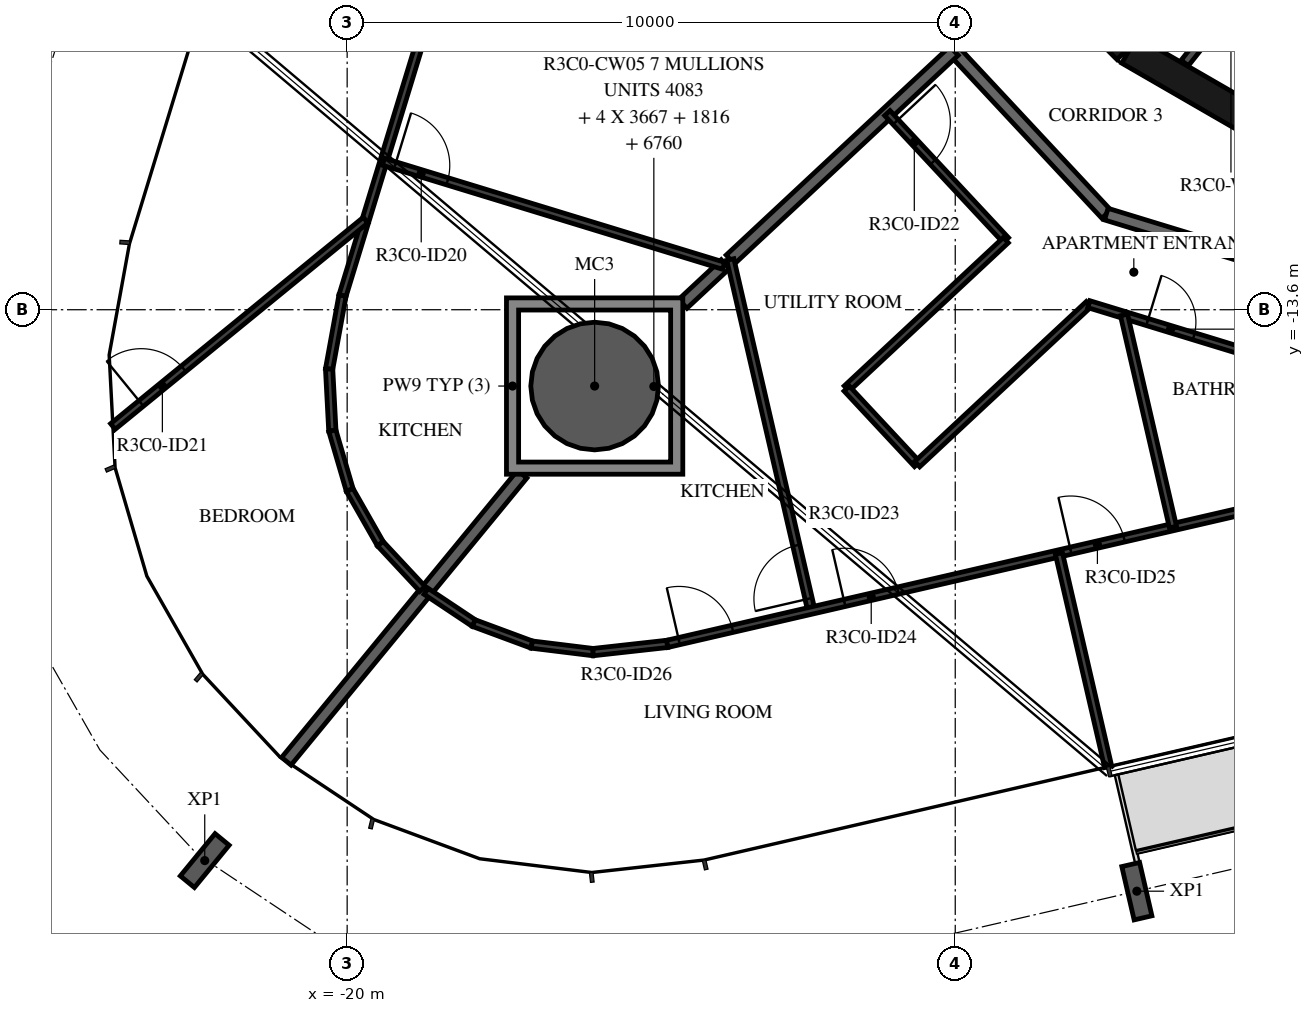
"""IFC4 building model, lengths in metres.
Left out: names, types, materials, properties, quantities, classifications, styles, units other than length and angle.
Written with IfcOpenShell. Run it as: python <this file> out.ifc"""

import sys

from ifc_helpers import new_model, si_unit, direction, frame, frame_2d, origin, origin_2d, place, context, subcontext, project, spatial, polyline, rectangle, hollow_circle, i_section, outline, extrude, element, fill, save


model = new_model("IFC4")
c1 = context("Model", 3, precision=1e-05, world=origin(), true_north=direction((0.0, 1.0)))
c2 = subcontext(c1, "Body", "Model", "MODEL_VIEW")
j1 = project(units=[si_unit("LENGTHUNIT", "METRE"), si_unit("PLANEANGLEUNIT", "RADIAN")], contexts=[c1])
p1 = place(None, origin())
s1 = spatial("IfcSite", under=j1, at=p1, CompositionType="ELEMENT")
p2 = place(p1, origin())
s2 = spatial("IfcBuilding", under=s1, at=p2, CompositionType="ELEMENT")
p3 = place(p2, frame((0.0, 0.0, 141.4)))
s3 = spatial("IfcBuildingStorey", under=s2, at=p3, CompositionType="ELEMENT", Elevation=141.4)
p4 = place(p3, frame((-15.93, -14.855, -0.38), z_axis=(0.0, 0.0, 1.0), x_axis=(1.0, 0.0, 0.0)))
e1 = element("IfcColumn", 1, at=p4, inside=s3, PredefinedType="COLUMN", context=c2, shape_type="SweptSolid", body=[
    extrude(hollow_circle(Radius=1.05, WallThickness=0.05, at=origin_2d()), origin(), (0.0, 0.0, 1.0), 2.616),
])
for number, where, z_axis, x_axis in (
    (2, (-22.342, -22.659, -0.38), (0.0, 0.0, 1.0), (-0.773, 0.635, 0.0)),
    (3, (-7.013, -23.162, -0.38), (0.0, 0.0, 1.0), (-0.974, -0.225, 0.0)),
):
    element("IfcColumn", number, at=place(p3, frame(where, z_axis=z_axis, x_axis=x_axis)), inside=s3, PredefinedType="COLUMN", context=c2, shape_type="SweptSolid", body=[
        extrude(i_section(OverallWidth=0.3, OverallDepth=0.9, WebThickness=0.019, FlangeThickness=0.035, FilletRadius=0.03, at=origin_2d()), origin(), (0.0, 0.0, 1.0), 2.616),
    ])
p5 = place(p3, frame((-9.308, -7.164, 0.0), z_axis=(0.0, 0.0, 1.0), x_axis=(0.707106781187, -0.707106781187, 0.0)))
e4 = element("IfcWall", 4, at=p5, inside=s3, PredefinedType="SHEAR", context=c2, shape_type="SweptSolid", body=[
    extrude(rectangle(XDim=3.032, YDim=0.5, at=frame_2d((1.516, 0.0))), origin(), (0.0, 0.0, 1.0), 3.05),
])
p6 = place(p3, frame((-7.137, -9.329, 0.0), z_axis=(0.0, 0.0, 1.0), x_axis=(0.865975092491, -0.500087131594, 0.0)))
e5 = element("IfcWall", 5, at=p6, inside=s3, PredefinedType="SHEAR", context=c2, shape_type="SweptSolid", body=[
    extrude(rectangle(XDim=3.033, YDim=0.5, at=frame_2d((1.516, 0.0))), origin(), (0.0, 0.0, 1.0), 3.05),
])
p7 = place(p3, frame((-4.706, -7.625, 0.0), z_axis=(0.0, 0.0, 1.0), x_axis=(-0.621392599334, -0.783499353856, 0.0)))
e6 = element("IfcWall", 6, at=p7, inside=s3, PredefinedType="PARTITIONING", context=c2, shape_type="SweptSolid", body=[
    extrude(rectangle(XDim=2.447, YDim=0.15, at=frame_2d((1.224, 0.0))), origin(), (0.0, 0.0, 1.0), 3.05),
])
p8 = place(p7, frame((0.774, 0.0, 0.0)))
e7 = element("IfcOpeningElement", 7, at=p8, cuts=e6, PredefinedType="OPENING", context=c2, shape_type="SweptSolid", body=[
    extrude(rectangle(XDim=0.9, YDim=2.1, at=frame_2d((0.45, 1.05))), frame((0.0, 0.085, 0.0), z_axis=(0.0, -1.0, 0.0), x_axis=(1.0, 0.0, 0.0)), (0.0, 0.0, 1.0), 0.17),
])
p9 = place(p3, frame((-12.523, -6.659, 0.0), z_axis=(0.0, 0.0, 1.0), x_axis=(0.682001841105, -0.731350455479, 0.0)))
e8 = element("IfcWall", 8, at=p9, inside=s3, PredefinedType="STANDARD", context=c2, shape_type="SweptSolid", body=[
    extrude(rectangle(XDim=7.342, YDim=0.2, at=frame_2d((3.671, 0.0))), origin(), (0.0, 0.0, 1.0), 3.05),
])
p10 = place(p3, frame((-7.516, -12.028, 0.0), z_axis=(0.0, 0.0, 1.0), x_axis=(0.956306642771, -0.292365533182, 0.0)))
e9 = element("IfcWall", 9, at=p10, inside=s3, PredefinedType="STANDARD", context=c2, shape_type="SweptSolid", body=[
    extrude(rectangle(XDim=7.342, YDim=0.2, at=frame_2d((3.671, 0.0))), origin(), (0.0, 0.0, 1.0), 3.05),
])
p11 = place(p10, frame((5.745, 0.0, 0.0)))
e10 = element("IfcOpeningElement", 10, at=p11, cuts=e9, PredefinedType="OPENING", context=c2, shape_type="SweptSolid", body=[
    extrude(rectangle(XDim=1.0, YDim=2.1, at=frame_2d((0.5, 1.05))), frame((0.0, 0.11, 0.0), z_axis=(0.0, -1.0, 0.0), x_axis=(1.0, 0.0, 0.0)), (0.0, 0.0, 1.0), 0.22),
])
p12 = place(p3, frame((-13.699, -12.774, 0.0), z_axis=(0.0, 0.0, 1.0), x_axis=(0.731353758457, 0.681998299111, 0.0)))
e11 = element("IfcWall", 11, at=p12, inside=s3, PredefinedType="STANDARD", context=c2, shape_type="SweptSolid", body=[
    extrude(rectangle(XDim=5.031, YDim=0.2, at=frame_2d((2.515, 0.0))), origin(), (0.0, 0.0, 1.0), 3.05),
])
p13 = place(p3, frame((-21.0, -21.025, 0.0), z_axis=(0.0, 0.0, 1.0), x_axis=(0.634846795952, 0.772638043116, 0.0)))
e12 = element("IfcWall", 12, at=p13, inside=s3, PredefinedType="STANDARD", context=c2, shape_type="SweptSolid", body=[
    extrude(rectangle(XDim=6.109, YDim=0.2, at=frame_2d((3.055, 0.0))), origin(), (0.0, 0.0, 1.0), 3.05),
])
p14 = place(p3, frame((-14.48, -13.503, 0.0), z_axis=(0.0, 0.0, 1.0), x_axis=(0.73152991834, 0.681809341806, 0.0)))
e13 = element("IfcWall", 13, at=p14, inside=s3, PredefinedType="STANDARD", context=c2, shape_type="SweptSolid", body=[
    extrude(rectangle(XDim=0.958, YDim=0.2, at=frame_2d((0.479, 0.0))), origin(), (0.0, 0.0, 1.0), 3.05),
])
p15 = place(p3, frame((-16.579, -1.928, 0.0), z_axis=(0.0, 0.0, 1.0), x_axis=(-0.29236733738, -0.956306091183, 0.0)))
e14 = element("IfcWall", 14, at=p15, inside=s3, PredefinedType="PARTITIONING", context=c2, shape_type="SweptSolid", body=[
    extrude(rectangle(XDim=11.963, YDim=0.12, at=frame_2d((5.981, 0.0))), origin(), (0.0, 0.0, 1.0), 3.05),
])
p16 = place(p15, frame((3.271, 0.0, 0.0)))
e15 = element("IfcOpeningElement", 15, at=p16, cuts=e14, PredefinedType="OPENING", context=c2, shape_type="SweptSolid", body=[
    extrude(rectangle(XDim=0.9, YDim=2.1, at=frame_2d((0.45, 1.05))), frame((0.0, 0.07, 0.0), z_axis=(0.0, -1.0, 0.0), x_axis=(1.0, 0.0, 0.0)), (0.0, 0.0, 1.0), 0.14),
])
p17 = place(p3, frame((-19.404, -11.167, 0.0), z_axis=(0.0, 0.0, 1.0), x_axis=(0.956314306829, -0.292340463423, 0.0)))
e16 = element("IfcWall", 16, at=p17, inside=s3, PredefinedType="PARTITIONING", context=c2, shape_type="SweptSolid", body=[
    extrude(rectangle(XDim=5.85, YDim=0.12, at=frame_2d((2.925, 0.0))), origin(), (0.0, 0.0, 1.0), 3.05),
])
p18 = place(p17, frame((0.2, 0.0, 0.0)))
e17 = element("IfcOpeningElement", 17, at=p18, cuts=e16, PredefinedType="OPENING", context=c2, shape_type="SweptSolid", body=[
    extrude(rectangle(XDim=0.9, YDim=2.1, at=frame_2d((0.45, 1.05))), frame((0.0, 0.07, 0.0), z_axis=(0.0, -1.0, 0.0), x_axis=(1.0, 0.0, 0.0)), (0.0, 0.0, 1.0), 0.14),
])
p19 = place(p3, frame((-23.852, -15.52, 0.0), z_axis=(0.0, 0.0, 1.0), x_axis=(0.774546990858, 0.632516370502, 0.0)))
e18 = element("IfcWall", 18, at=p19, inside=s3, PredefinedType="PARTITIONING", context=c2, shape_type="SweptSolid", body=[
    extrude(rectangle(XDim=5.365, YDim=0.12, at=frame_2d((2.682, 0.0))), origin(), (0.0, 0.0, 1.0), 3.05),
])
p20 = place(p19, frame((0.6, 0.0, 0.0)))
e19 = element("IfcOpeningElement", 19, at=p20, cuts=e18, PredefinedType="OPENING", context=c2, shape_type="SweptSolid", body=[
    extrude(rectangle(XDim=0.9, YDim=2.1, at=frame_2d((0.45, 1.05))), frame((0.0, 0.07, 0.0), z_axis=(0.0, -1.0, 0.0), x_axis=(1.0, 0.0, 0.0)), (0.0, 0.0, 1.0), 0.14),
])
p21 = place(p3, frame((-20.077, -13.368, 0.0), z_axis=(0.0, 0.0, 1.0), x_axis=(-0.179288174895, -0.983796600087, 0.0)))
e20 = element("IfcWall", 20, at=p21, inside=s3, PredefinedType="PARTITIONING", context=c2, shape_type="SweptSolid", body=[
    extrude(rectangle(XDim=1.227, YDim=0.12, at=frame_2d((0.613, 0.0))), origin(), (0.0, 0.0, 1.0), 3.05),
])
p22 = place(p3, frame((-20.297, -14.575, 0.0), z_axis=(0.0, 0.0, 1.0), x_axis=(0.052142637988, -0.998639647372, 0.0)))
e21 = element("IfcWall", 21, at=p22, inside=s3, PredefinedType="PARTITIONING", context=c2, shape_type="SweptSolid", body=[
    extrude(rectangle(XDim=1.016, YDim=0.12, at=frame_2d((0.508, 0.0))), origin(), (0.0, 0.0, 1.0), 3.05),
])
for number, where, z_axis, x_axis in (
    (22, (-20.244, -15.59, 0.0), (0.0, 0.0, 1.0), (0.281, -0.96, 0.0)),
    (23, (-19.958, -16.565, 0.0), (0.0, 0.0, 1.0), (0.495, -0.869, 0.0)),
    (24, (-19.455, -17.448, 0.0), (0.0, 0.0, 1.0), (0.682, -0.731, 0.0)),
):
    element("IfcWall", number, at=place(p3, frame(where, z_axis=z_axis, x_axis=x_axis)), inside=s3, PredefinedType="PARTITIONING", context=c2, shape_type="SweptSolid", body=[
        extrude(rectangle(XDim=1.016, YDim=0.12, at=frame_2d((0.508, 0.0))), origin(), (0.0, 0.0, 1.0), 3.05),
    ])
p23 = place(p3, frame((-11.117, -10.366, 0.0), z_axis=(0.0, 0.0, 1.0), x_axis=(0.682029016154, -0.73132511315, 0.0)))
e25 = element("IfcWall", 25, at=p23, inside=s3, PredefinedType="PARTITIONING", context=c2, shape_type="SweptSolid", body=[
    extrude(rectangle(XDim=2.858, YDim=0.12, at=frame_2d((1.429, 0.0))), origin(), (0.0, 0.0, 1.0), 3.05),
])
p24 = place(p23, frame((0.2, 0.0, 0.0)))
e26 = element("IfcOpeningElement", 26, at=p24, cuts=e25, PredefinedType="OPENING", context=c2, shape_type="SweptSolid", body=[
    extrude(rectangle(XDim=0.9, YDim=2.1, at=frame_2d((0.45, 1.05))), frame((0.0, 0.07, 0.0), z_axis=(0.0, -1.0, 0.0), x_axis=(1.0, 0.0, 0.0)), (0.0, 0.0, 1.0), 0.14),
])
p25 = place(p3, frame((-9.168, -12.456, 0.0), z_axis=(0.0, 0.0, 1.0), x_axis=(-0.731372816465, -0.681977861324, 0.0)))
e27 = element("IfcWall", 27, at=p25, inside=s3, PredefinedType="PARTITIONING", context=c2, shape_type="SweptSolid", body=[
    extrude(rectangle(XDim=3.578, YDim=0.12, at=frame_2d((1.789, 0.0))), origin(), (0.0, 0.0, 1.0), 3.05),
])
p26 = place(p3, frame((-11.785, -14.897, 0.0), z_axis=(0.0, 0.0, 1.0), x_axis=(0.681975367709, -0.73137514166, 0.0)))
e28 = element("IfcWall", 28, at=p26, inside=s3, PredefinedType="PARTITIONING", context=c2, shape_type="SweptSolid", body=[
    extrude(rectangle(XDim=1.7, YDim=0.12, at=frame_2d((0.85, 0.0))), origin(), (0.0, 0.0, 1.0), 3.05),
])
p27 = place(p3, frame((-10.625, -16.14, 0.0), z_axis=(0.0, 0.0, 1.0), x_axis=(0.73135399721, 0.68199804308, 0.0)))
e29 = element("IfcWall", 29, at=p27, inside=s3, PredefinedType="PARTITIONING", context=c2, shape_type="SweptSolid", body=[
    extrude(rectangle(XDim=3.858, YDim=0.12, at=frame_2d((1.929, 0.0))), origin(), (0.0, 0.0, 1.0), 3.05),
])
p28 = place(p3, frame((-7.804, -13.509, 0.0), z_axis=(0.0, 0.0, 1.0), x_axis=(0.956309088343, -0.292357533772, 0.0)))
e30 = element("IfcWall", 30, at=p28, inside=s3, PredefinedType="PARTITIONING", context=c2, shape_type="SweptSolid", body=[
    extrude(rectangle(XDim=7.586, YDim=0.12, at=frame_2d((3.793, 0.0))), origin(), (0.0, 0.0, 1.0), 3.05),
])
p29 = place(p28, frame((1.006, 0.0, 0.0)))
e31 = element("IfcOpeningElement", 31, at=p29, cuts=e30, PredefinedType="OPENING", context=c2, shape_type="SweptSolid", body=[
    extrude(rectangle(XDim=0.8, YDim=2.1, at=frame_2d((0.4, 1.05))), frame((0.0, 0.07, 0.0), z_axis=(0.0, -1.0, 0.0), x_axis=(1.0, 0.0, 0.0)), (0.0, 0.0, 1.0), 0.14),
])
p30 = place(p3, frame((-12.366, -18.548, 0.0), z_axis=(0.0, 0.0, 1.0), x_axis=(-0.224958805164, 0.974368275335, 0.0)))
e32 = element("IfcWall", 32, at=p30, inside=s3, PredefinedType="PARTITIONING", context=c2, shape_type="SweptSolid", body=[
    extrude(rectangle(XDim=5.926, YDim=0.12, at=frame_2d((2.963, 0.0))), origin(), (0.0, 0.0, 1.0), 3.05),
])
p31 = place(p30, frame((0.2, 0.0, 0.0)))
e33 = element("IfcOpeningElement", 33, at=p31, cuts=e32, PredefinedType="OPENING", context=c2, shape_type="SweptSolid", body=[
    extrude(rectangle(XDim=0.9, YDim=2.1, at=frame_2d((0.45, 1.05))), frame((0.0, 0.07, 0.0), z_axis=(0.0, -1.0, 0.0), x_axis=(1.0, 0.0, 0.0)), (0.0, 0.0, 1.0), 0.14),
])
p32 = place(p3, frame((-18.703, -18.23, 0.0), z_axis=(0.0, 0.0, 1.0), x_axis=(0.832328473933, -0.554282699965, 0.0)))
e34 = element("IfcWall", 34, at=p32, inside=s3, PredefinedType="PARTITIONING", context=c2, shape_type="SweptSolid", body=[
    extrude(rectangle(XDim=0.945, YDim=0.12, at=frame_2d((0.472, 0.0))), origin(), (0.0, 0.0, 1.0), 3.05),
])
p33 = place(p3, frame((-17.917, -18.754, 0.0), z_axis=(0.0, 0.0, 1.0), x_axis=(0.937684971769, -0.347486537462, 0.0)))
e35 = element("IfcWall", 35, at=p33, inside=s3, PredefinedType="PARTITIONING", context=c2, shape_type="SweptSolid", body=[
    extrude(rectangle(XDim=1.016, YDim=0.12, at=frame_2d((0.508, 0.0))), origin(), (0.0, 0.0, 1.0), 3.05),
])
p34 = place(p3, frame((-16.964, -19.107, 0.0), z_axis=(0.0, 0.0, 1.0), x_axis=(0.992523553766, -0.122053247474, 0.0)))
e36 = element("IfcWall", 36, at=p34, inside=s3, PredefinedType="PARTITIONING", context=c2, shape_type="SweptSolid", body=[
    extrude(rectangle(XDim=1.016, YDim=0.12, at=frame_2d((0.508, 0.0))), origin(), (0.0, 0.0, 1.0), 3.05),
])
p35 = place(p3, frame((-15.956, -19.231, 0.0), z_axis=(0.0, 0.0, 1.0), x_axis=(0.993883734674, 0.110431526075, 0.0)))
e37 = element("IfcWall", 37, at=p35, inside=s3, PredefinedType="PARTITIONING", context=c2, shape_type="SweptSolid", body=[
    extrude(rectangle(XDim=1.227, YDim=0.12, at=frame_2d((0.614, 0.0))), origin(), (0.0, 0.0, 1.0), 3.05),
])
p36 = place(p3, frame((-14.736, -19.095, 0.0), z_axis=(0.0, 0.0, 1.0), x_axis=(0.974368335243, 0.224958545682, 0.0)))
e38 = element("IfcWall", 38, at=p36, inside=s3, PredefinedType="PARTITIONING", context=c2, shape_type="SweptSolid", body=[
    extrude(rectangle(XDim=19.263, YDim=0.12, at=frame_2d((9.632, 0.0))), origin(), (0.0, 0.0, 1.0), 3.05),
])
p37 = place(p36, frame((2.993, 0.0, 0.0)))
e39 = element("IfcOpeningElement", 39, at=p37, cuts=e38, PredefinedType="OPENING", context=c2, shape_type="SweptSolid", body=[
    extrude(rectangle(XDim=0.9, YDim=2.1, at=frame_2d((0.45, 1.05))), frame((0.0, 0.07, 0.0), z_axis=(0.0, -1.0, 0.0), x_axis=(1.0, 0.0, 0.0)), (0.0, 0.0, 1.0), 0.14),
])
p38 = place(p36, frame((6.81, 0.0, 0.0)))
e40 = element("IfcOpeningElement", 40, at=p38, cuts=e38, PredefinedType="OPENING", context=c2, shape_type="SweptSolid", body=[
    extrude(rectangle(XDim=0.9, YDim=2.1, at=frame_2d((0.45, 1.05))), frame((0.0, 0.07, 0.0), z_axis=(0.0, -1.0, 0.0), x_axis=(1.0, 0.0, 0.0)), (0.0, 0.0, 1.0), 0.14),
])
p39 = place(p36, frame((0.2, 0.0, 0.0)))
e41 = element("IfcOpeningElement", 41, at=p39, cuts=e38, PredefinedType="OPENING", context=c2, shape_type="SweptSolid", body=[
    extrude(rectangle(XDim=0.9, YDim=2.1, at=frame_2d((0.45, 1.05))), frame((0.0, 0.07, 0.0), z_axis=(0.0, -1.0, 0.0), x_axis=(1.0, 0.0, 0.0)), (0.0, 0.0, 1.0), 0.14),
])
p40 = place(p36, frame((14.839, 0.0, 0.0)))
e42 = element("IfcOpeningElement", 42, at=p40, cuts=e38, PredefinedType="OPENING", context=c2, shape_type="SweptSolid", body=[
    extrude(rectangle(XDim=0.9, YDim=2.1, at=frame_2d((0.45, 1.05))), frame((0.0, 0.07, 0.0), z_axis=(0.0, -1.0, 0.0), x_axis=(1.0, 0.0, 0.0)), (0.0, 0.0, 1.0), 0.14),
])
p41 = place(p3, frame((-6.419, -17.175, 0.0), z_axis=(0.0, 0.0, 1.0), x_axis=(-0.224979003559, 0.974363611778, 0.0)))
e43 = element("IfcWall", 43, at=p41, inside=s3, PredefinedType="PARTITIONING", context=c2, shape_type="SweptSolid", body=[
    extrude(rectangle(XDim=3.581, YDim=0.12, at=frame_2d((1.791, 0.0))), origin(), (0.0, 0.0, 1.0), 3.05),
])
p42 = place(p3, frame((-7.486, -21.116, 0.0), z_axis=(0.0, 0.0, 1.0), x_axis=(-0.224943703639, 0.9743717618, 0.0)))
e44 = element("IfcWall", 44, at=p42, inside=s3, PredefinedType="PARTITIONING", context=c2, shape_type="SweptSolid", body=[
    extrude(rectangle(XDim=3.6, YDim=0.12, at=frame_2d((1.8, 0.0))), origin(), (0.0, 0.0, 1.0), 3.05),
])
p43 = place(p3, origin())
e45 = element("IfcWall", 45, at=p43, inside=s3, PredefinedType="STANDARD", context=c2, shape_type="SweptSolid", body=[
    extrude(outline(polyline([(-14.48, -13.405), (-14.48, -16.305), (-17.38, -16.305), (-17.38, -13.405), (-14.48, -13.405)]), holes=[polyline([(-17.18, -16.105), (-14.68, -16.105), (-14.68, -13.605), (-17.18, -13.605), (-17.18, -16.105)])]), origin(), (0.0, 0.0, 1.0), 3.05),
])
p44 = place(p18, origin())
e46 = element("IfcDoor", 46, at=p44, inside=s3, OperationType="SINGLE_SWING_RIGHT", PredefinedType="DOOR", context=c2, shape_type="SweptSolid", body=[
    extrude(rectangle(XDim=0.9, YDim=2.1, at=frame_2d((0.45, 1.05))), frame((0.0, 0.025, 0.0), z_axis=(0.0, -1.0, 0.0), x_axis=(1.0, 0.0, 0.0)), (0.0, 0.0, 1.0), 0.05),
])
fill(e17, e46)
p45 = place(p20, origin())
e47 = element("IfcDoor", 47, at=p45, inside=s3, OperationType="SINGLE_SWING_RIGHT", PredefinedType="DOOR", context=c2, shape_type="SweptSolid", body=[
    extrude(rectangle(XDim=0.9, YDim=2.1, at=frame_2d((0.45, 1.05))), frame((0.0, 0.025, 0.0), z_axis=(0.0, -1.0, 0.0), x_axis=(1.0, 0.0, 0.0)), (0.0, 0.0, 1.0), 0.05),
])
fill(e19, e47)
p46 = place(p24, origin())
e48 = element("IfcDoor", 48, at=p46, inside=s3, OperationType="SINGLE_SWING_LEFT", PredefinedType="DOOR", context=c2, shape_type="SweptSolid", body=[
    extrude(rectangle(XDim=0.9, YDim=2.1, at=frame_2d((0.45, 1.05))), frame((0.0, 0.025, 0.0), z_axis=(0.0, -1.0, 0.0), x_axis=(1.0, 0.0, 0.0)), (0.0, 0.0, 1.0), 0.05),
])
fill(e26, e48)
p47 = place(p29, origin())
e49 = element("IfcDoor", 49, at=p47, inside=s3, OperationType="SINGLE_SWING_LEFT", PredefinedType="DOOR", context=c2, shape_type="SweptSolid", body=[
    extrude(rectangle(XDim=0.8, YDim=2.1, at=frame_2d((0.4, 1.05))), frame((0.0, 0.025, 0.0), z_axis=(0.0, -1.0, 0.0), x_axis=(1.0, 0.0, 0.0)), (0.0, 0.0, 1.0), 0.05),
])
fill(e31, e49)
p48 = place(p31, origin())
e50 = element("IfcDoor", 50, at=p48, inside=s3, OperationType="SINGLE_SWING_LEFT", PredefinedType="DOOR", context=c2, shape_type="SweptSolid", body=[
    extrude(rectangle(XDim=0.9, YDim=2.1, at=frame_2d((0.45, 1.05))), frame((0.0, 0.025, 0.0), z_axis=(0.0, -1.0, 0.0), x_axis=(1.0, 0.0, 0.0)), (0.0, 0.0, 1.0), 0.05),
])
fill(e33, e50)
p49 = place(p37, origin())
e51 = element("IfcDoor", 51, at=p49, inside=s3, OperationType="SINGLE_SWING_LEFT", PredefinedType="DOOR", context=c2, shape_type="SweptSolid", body=[
    extrude(rectangle(XDim=0.9, YDim=2.1, at=frame_2d((0.45, 1.05))), frame((0.0, 0.025, 0.0), z_axis=(0.0, -1.0, 0.0), x_axis=(1.0, 0.0, 0.0)), (0.0, 0.0, 1.0), 0.05),
])
fill(e39, e51)
p50 = place(p38, origin())
e52 = element("IfcDoor", 52, at=p50, inside=s3, OperationType="SINGLE_SWING_LEFT", PredefinedType="DOOR", context=c2, shape_type="SweptSolid", body=[
    extrude(rectangle(XDim=0.9, YDim=2.1, at=frame_2d((0.45, 1.05))), frame((0.0, 0.025, 0.0), z_axis=(0.0, -1.0, 0.0), x_axis=(1.0, 0.0, 0.0)), (0.0, 0.0, 1.0), 0.05),
])
fill(e40, e52)
p51 = place(p39, origin())
e53 = element("IfcDoor", 53, at=p51, inside=s3, OperationType="SINGLE_SWING_LEFT", PredefinedType="DOOR", context=c2, shape_type="SweptSolid", body=[
    extrude(rectangle(XDim=0.9, YDim=2.1, at=frame_2d((0.45, 1.05))), frame((0.0, 0.025, 0.0), z_axis=(0.0, -1.0, 0.0), x_axis=(1.0, 0.0, 0.0)), (0.0, 0.0, 1.0), 0.05),
])
fill(e41, e53)
save(model, sys.argv[1])
